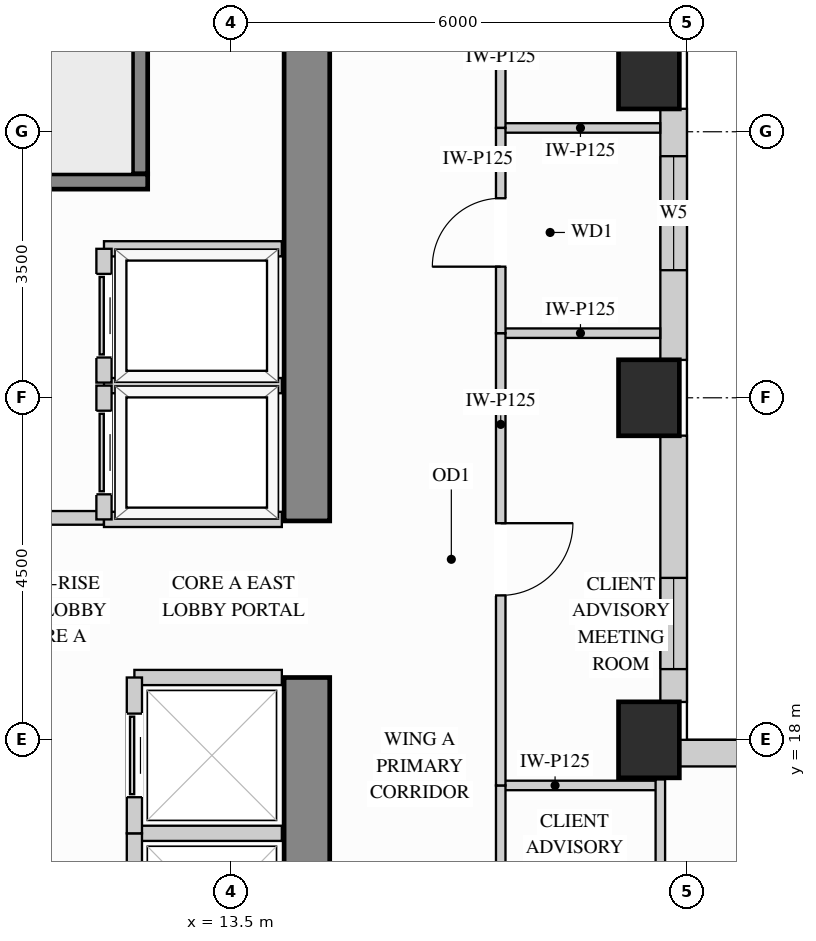
"""IFC4 building model, lengths in metres.
Left out: names, types, materials, properties, quantities, classifications, styles, units other than length and angle.
Written with IfcOpenShell. Run it as: python <this file> out.ifc"""

import sys

from ifc_helpers import new_model, si_unit, direction, frame, frame_2d, origin, origin_2d, place, context, subcontext, project, spatial, rectangle, extrude, source, transform, mapped, element, fill, save


model = new_model("IFC4")
c1 = context("Model", 3, precision=1e-05, world=origin(), true_north=direction((0.0, 1.0)))
c2 = subcontext(c1, "Body", "Model", "MODEL_VIEW")
j1 = project(units=[si_unit("LENGTHUNIT", "METRE"), si_unit("PLANEANGLEUNIT", "RADIAN")], contexts=[c1])
p1 = place(None, origin())
s1 = spatial("IfcSite", under=j1, at=p1, CompositionType="ELEMENT")
p2 = place(p1, origin())
s2 = spatial("IfcBuilding", under=s1, at=p2, CompositionType="ELEMENT")
p3 = place(p2, frame((0.0, 0.0, 164.7)))
s3 = spatial("IfcBuildingStorey", under=s2, at=p3, CompositionType="ELEMENT", Elevation=164.7)
m1 = source(origin(), c2, "Body", "SweptSolid", [
    extrude(rectangle(XDim=0.8, YDim=1.0, at=origin_2d()), origin(), (0.0, 0.0, 1.0), 3.4),
])
for number, where, z_axis, x_axis in (
    (1, (19.0, 18.0, 0.0), (0.0, 0.0, 1.0), (1.0, 0.0, 0.0)),
    (2, (19.0, 22.5, 0.0), (0.0, 0.0, 1.0), (1.0, 0.0, 0.0)),
    (3, (19.0, 26.8, 0.0), (0.0, 0.0, 1.0), (1.0, 0.0, 0.0)),
):
    element("IfcColumn", number, at=place(p3, frame(where, z_axis=z_axis, x_axis=x_axis)), inside=s3, PredefinedType="COLUMN", context=c2, shape_type="MappedRepresentation", body=[
        mapped(m1, transform((0.0, 0.0, 0.0), x_axis=(1.0, 0.0, 0.0), y_axis=(0.0, 1.0, 0.0), z_axis=(0.0, 0.0, 1.0))),
    ])
m2 = source(origin(), c2, "Body", "SweptSolid", [
    extrude(rectangle(XDim=10.02, YDim=0.6, at=frame_2d((5.01, 0.0))), origin(), (0.0, 0.0, 1.0), 3.4),
])
p4 = place(p3, frame((14.5, 8.8, 0.0), z_axis=(0.0, 0.0, 1.0), x_axis=(0.0, 1.0, 0.0)))
e4 = element("IfcWall", 4, at=p4, inside=s3, PredefinedType="SHEAR", context=c2, shape_type="MappedRepresentation", body=[
    mapped(m2, transform((0.0, 0.0, 0.0), x_axis=(1.0, 0.0, 0.0), y_axis=(0.0, 1.0, 0.0), z_axis=(0.0, 0.0, 1.0))),
])
m3 = source(origin(), c2, "Body", "SweptSolid", [
    extrude(rectangle(XDim=8.32, YDim=0.6, at=frame_2d((4.16, 0.0))), origin(), (0.0, 0.0, 1.0), 3.4),
])
p5 = place(p3, frame((14.5, 20.88, 0.0), z_axis=(0.0, 0.0, 1.0), x_axis=(0.0, 1.0, 0.0)))
e5 = element("IfcWall", 5, at=p5, inside=s3, PredefinedType="SHEAR", context=c2, shape_type="MappedRepresentation", body=[
    mapped(m3, transform((0.0, 0.0, 0.0), x_axis=(1.0, 0.0, 0.0), y_axis=(0.0, 1.0, 0.0), z_axis=(0.0, 0.0, 1.0))),
])
p6 = place(p3, frame((34.502, 17.825, 0.0), z_axis=(0.0, 0.0, 1.0), x_axis=(-1.0, 0.0, 0.0)))
e6 = element("IfcWall", 6, at=p6, inside=s3, PredefinedType="SOLIDWALL", context=c2, shape_type="SweptSolid", body=[
    extrude(rectangle(XDim=15.104, YDim=0.35, at=frame_2d((7.552, 0.0))), origin(), (0.0, 0.0, 1.0), 3.385),
])
p7 = place(p6, frame((4.131, 0.0, 0.78)))
e7 = element("IfcOpeningElement", 7, at=p7, cuts=e6, PredefinedType="OPENING", context=c2, shape_type="SweptSolid", body=[
    extrude(rectangle(XDim=1.5, YDim=2.0, at=frame_2d((0.75, 1.0))), frame((0.0, 0.185, 0.0), z_axis=(0.0, -1.0, 0.0), x_axis=(1.0, 0.0, 0.0)), (0.0, 0.0, 1.0), 0.37),
])
p8 = place(p6, frame((9.442, 0.0, 0.78)))
e8 = element("IfcOpeningElement", 8, at=p8, cuts=e6, PredefinedType="OPENING", context=c2, shape_type="SweptSolid", body=[
    extrude(rectangle(XDim=1.5, YDim=2.0, at=frame_2d((0.75, 1.0))), frame((0.0, 0.185, 0.0), z_axis=(0.0, -1.0, 0.0), x_axis=(1.0, 0.0, 0.0)), (0.0, 0.0, 1.0), 0.37),
])
p9 = place(p3, frame((19.325, 18.498, 0.0), z_axis=(0.0, 0.0, 1.0), x_axis=(0.0, 1.0, 0.0)))
e9 = element("IfcWall", 9, at=p9, inside=s3, PredefinedType="SOLIDWALL", context=c2, shape_type="SweptSolid", body=[
    extrude(rectangle(XDim=3.504, YDim=0.35, at=frame_2d((1.752, 0.0))), origin(), (0.0, 0.0, 1.0), 2.612),
])
p10 = place(p9, frame((0.433, 0.0, 0.78)))
e10 = element("IfcOpeningElement", 10, at=p10, cuts=e9, PredefinedType="OPENING", context=c2, shape_type="SweptSolid", body=[
    extrude(rectangle(XDim=1.2, YDim=1.652, at=frame_2d((0.6, 0.826))), frame((0.0, 0.185, 0.0), z_axis=(0.0, -1.0, 0.0), x_axis=(1.0, 0.0, 0.0)), (0.0, 0.0, 1.0), 0.37),
])
p11 = place(p3, frame((19.325, 22.998, 0.0), z_axis=(0.0, 0.0, 1.0), x_axis=(0.0, 1.0, 0.0)))
e11 = element("IfcWall", 11, at=p11, inside=s3, PredefinedType="SOLIDWALL", context=c2, shape_type="SweptSolid", body=[
    extrude(rectangle(XDim=3.304, YDim=0.35, at=frame_2d((1.652, 0.0))), origin(), (0.0, 0.0, 1.0), 2.612),
])
p12 = place(p11, frame((1.18, 0.0, 0.78)))
e12 = element("IfcOpeningElement", 12, at=p12, cuts=e11, PredefinedType="OPENING", context=c2, shape_type="SweptSolid", body=[
    extrude(rectangle(XDim=1.5, YDim=1.652, at=frame_2d((0.75, 0.826))), frame((0.0, 0.185, 0.0), z_axis=(0.0, -1.0, 0.0), x_axis=(1.0, 0.0, 0.0)), (0.0, 0.0, 1.0), 0.37),
])
p13 = place(p3, frame((7.15, 20.92, 0.0), z_axis=(0.0, 0.0, 1.0), x_axis=(1.0, 0.0, 0.0)))
e13 = element("IfcWall", 13, at=p13, inside=s3, PredefinedType="PARTITIONING", context=c2, shape_type="SweptSolid", body=[
    extrude(rectangle(XDim=4.68, YDim=0.18, at=frame_2d((2.34, 0.0))), origin(), (0.0, 0.0, 1.0), 3.385),
])
p14 = place(p13, frame((2.2, 0.0, 0.0)))
e14 = element("IfcOpeningElement", 14, at=p14, cuts=e13, PredefinedType="OPENING", context=c2, shape_type="SweptSolid", body=[
    extrude(rectangle(XDim=1.1, YDim=2.15, at=frame_2d((0.55, 1.075))), frame((0.0, 0.1, 0.0), z_axis=(0.0, -1.0, 0.0), x_axis=(1.0, 0.0, 0.0)), (0.0, 0.0, 1.0), 0.2),
])
m4 = source(origin(), c2, "Body", "SweptSolid", [
    extrude(rectangle(XDim=2.1, YDim=0.125, at=frame_2d((1.05, 0.0))), origin(), (0.0, 0.0, 1.0), 3.385),
])
p15 = place(p3, frame((17.05, 17.4, 0.0), z_axis=(0.0, 0.0, 1.0), x_axis=(1.0, 0.0, 0.0)))
e15 = element("IfcWall", 15, at=p15, inside=s3, PredefinedType="PARTITIONING", context=c2, shape_type="MappedRepresentation", body=[
    mapped(m4, transform((0.0, 0.0, 0.0), x_axis=(1.0, 0.0, 0.0), y_axis=(0.0, 1.0, 0.0), z_axis=(0.0, 0.0, 1.0))),
])
m5 = source(origin(), c2, "Body", "SweptSolid", [
    extrude(rectangle(XDim=2.098, YDim=0.125, at=frame_2d((1.049, 0.0))), origin(), (0.0, 0.0, 1.0), 3.385),
])
for number, where, z_axis, x_axis in (
    (16, (17.05, 23.35, 0.0), (0.0, 0.0, 1.0), (1.0, 0.0, 0.0)),
    (17, (17.05, 26.05, 0.0), (0.0, 0.0, 1.0), (1.0, 0.0, 0.0)),
):
    element("IfcWall", number, at=place(p3, frame(where, z_axis=z_axis, x_axis=x_axis)), inside=s3, PredefinedType="PARTITIONING", context=c2, shape_type="MappedRepresentation", body=[
        mapped(m5, transform((0.0, 0.0, 0.0), x_axis=(1.0, 0.0, 0.0), y_axis=(0.0, 1.0, 0.0), z_axis=(0.0, 0.0, 1.0))),
    ])
m6 = source(origin(), c2, "Body", "SweptSolid", [
    extrude(rectangle(XDim=3.46, YDim=0.125, at=frame_2d((1.73, 0.0))), origin(), (0.0, 0.0, 1.0), 2.773),
])
p16 = place(p3, frame((19.15, 14.02, 0.0), z_axis=(0.0, 0.0, 1.0), x_axis=(0.0, 1.0, 0.0)))
e18 = element("IfcWall", 18, at=p16, inside=s3, PredefinedType="PARTITIONING", context=c2, shape_type="MappedRepresentation", body=[
    mapped(m6, transform((0.0, 0.0, 0.0), x_axis=(1.0, 0.0, 0.0), y_axis=(0.0, 1.0, 0.0), z_axis=(0.0, 0.0, 1.0))),
])
p17 = place(p3, frame((17.05, 12.35, 0.0), z_axis=(0.0, 0.0, 1.0), x_axis=(0.0, 1.0, 0.0)))
e19 = element("IfcWall", 19, at=p17, inside=s3, PredefinedType="PARTITIONING", context=c2, shape_type="SweptSolid", body=[
    extrude(rectangle(XDim=5.05, YDim=0.125, at=frame_2d((2.525, 0.0))), origin(), (0.0, 0.0, 1.0), 3.385),
])
p18 = place(p17, frame((2.05, 0.0, 0.0)))
e20 = element("IfcOpeningElement", 20, at=p18, cuts=e19, PredefinedType="OPENING", context=c2, shape_type="SweptSolid", body=[
    extrude(rectangle(XDim=0.95, YDim=2.15, at=frame_2d((0.475, 1.075))), frame((0.0, 0.073, 0.0), z_axis=(0.0, -1.0, 0.0), x_axis=(1.0, 0.0, 0.0)), (0.0, 0.0, 1.0), 0.145),
])
p19 = place(p3, frame((17.05, 17.4, 0.0), z_axis=(0.0, 0.0, 1.0), x_axis=(0.0, 1.0, 0.0)))
e21 = element("IfcWall", 21, at=p19, inside=s3, PredefinedType="PARTITIONING", context=c2, shape_type="SweptSolid", body=[
    extrude(rectangle(XDim=5.95, YDim=0.125, at=frame_2d((2.975, 0.0))), origin(), (0.0, 0.0, 1.0), 3.385),
])
p20 = place(p19, frame((2.5, 0.0, 0.0)))
e22 = element("IfcOpeningElement", 22, at=p20, cuts=e21, PredefinedType="OPENING", context=c2, shape_type="SweptSolid", body=[
    extrude(rectangle(XDim=0.95, YDim=2.15, at=frame_2d((0.475, 1.075))), frame((0.0, 0.073, 0.0), z_axis=(0.0, -1.0, 0.0), x_axis=(1.0, 0.0, 0.0)), (0.0, 0.0, 1.0), 0.145),
])
p21 = place(p3, frame((17.05, 26.05, 0.0), z_axis=(0.0, 0.0, 1.0), x_axis=(0.0, 1.0, 0.0)))
e23 = element("IfcWall", 23, at=p21, inside=s3, PredefinedType="PARTITIONING", context=c2, shape_type="SweptSolid", body=[
    extrude(rectangle(XDim=6.1, YDim=0.125, at=frame_2d((3.05, 0.0))), origin(), (0.0, 0.0, 1.0), 3.385),
])
p22 = place(p21, frame((2.575, 0.0, 0.0)))
e24 = element("IfcOpeningElement", 24, at=p22, cuts=e23, PredefinedType="OPENING", context=c2, shape_type="SweptSolid", body=[
    extrude(rectangle(XDim=0.95, YDim=2.15, at=frame_2d((0.475, 1.075))), frame((0.0, 0.073, 0.0), z_axis=(0.0, -1.0, 0.0), x_axis=(1.0, 0.0, 0.0)), (0.0, 0.0, 1.0), 0.145),
])
p23 = place(p3, frame((17.05, 23.35, 0.0), z_axis=(0.0, 0.0, 1.0), x_axis=(0.0, 1.0, 0.0)))
e25 = element("IfcWall", 25, at=p23, inside=s3, PredefinedType="PARTITIONING", context=c2, shape_type="SweptSolid", body=[
    extrude(rectangle(XDim=2.7, YDim=0.125, at=frame_2d((1.35, 0.0))), origin(), (0.0, 0.0, 1.0), 3.385),
])
p24 = place(p23, frame((0.875, 0.0, 0.0)))
e26 = element("IfcOpeningElement", 26, at=p24, cuts=e25, PredefinedType="OPENING", context=c2, shape_type="SweptSolid", body=[
    extrude(rectangle(XDim=0.9, YDim=2.15, at=frame_2d((0.45, 1.075))), frame((0.0, 0.073, 0.0), z_axis=(0.0, -1.0, 0.0), x_axis=(1.0, 0.0, 0.0)), (0.0, 0.0, 1.0), 0.145),
])
m7 = source(origin(), c2, "Body", "SweptSolid", [
    extrude(rectangle(XDim=2.34, YDim=0.2, at=frame_2d((1.17, 0.0))), origin(), (0.0, 0.0, 1.0), 3.385),
])
for number, where, z_axis, x_axis in (
    (27, (11.83, 22.66, 0.0), (0.0, 0.0, 1.0), (1.0, 0.0, 0.0)),
    (28, (11.83, 20.9, 0.0), (0.0, 0.0, 1.0), (1.0, 0.0, 0.0)),
):
    element("IfcWall", number, at=place(p3, frame(where, z_axis=z_axis, x_axis=x_axis)), inside=s3, PredefinedType="PARTITIONING", context=c2, shape_type="MappedRepresentation", body=[
        mapped(m7, transform((0.0, 0.0, 0.0), x_axis=(1.0, 0.0, 0.0), y_axis=(0.0, 1.0, 0.0), z_axis=(0.0, 0.0, 1.0))),
    ])
p25 = place(p3, frame((11.83, 20.9, 0.0), z_axis=(0.0, 0.0, 1.0), x_axis=(0.0, 1.0, 0.0)))
e29 = element("IfcWall", 29, at=p25, inside=s3, PredefinedType="PARTITIONING", context=c2, shape_type="SweptSolid", body=[
    extrude(rectangle(XDim=1.76, YDim=0.2, at=frame_2d((0.88, 0.0))), origin(), (0.0, 0.0, 1.0), 3.385),
])
p26 = place(p25, frame((0.33, 0.0, 0.0)))
e30 = element("IfcOpeningElement", 30, at=p26, cuts=e29, PredefinedType="OPENING", context=c2, shape_type="SweptSolid", body=[
    extrude(rectangle(XDim=1.1, YDim=2.2, at=frame_2d((0.55, 1.1))), frame((0.0, 0.11, 0.0), z_axis=(0.0, -1.0, 0.0), x_axis=(1.0, 0.0, 0.0)), (0.0, 0.0, 1.0), 0.22),
])
p27 = place(p3, frame((11.83, 24.46, 0.0), z_axis=(0.0, 0.0, 1.0), x_axis=(1.0, 0.0, 0.0)))
e31 = element("IfcWall", 31, at=p27, inside=s3, PredefinedType="PARTITIONING", context=c2, shape_type="MappedRepresentation", body=[
    mapped(m7, transform((0.0, 0.0, 0.0), x_axis=(1.0, 0.0, 0.0), y_axis=(0.0, 1.0, 0.0), z_axis=(0.0, 0.0, 1.0))),
])
p28 = place(p3, frame((11.83, 22.7, 0.0), z_axis=(0.0, 0.0, 1.0), x_axis=(0.0, 1.0, 0.0)))
e32 = element("IfcWall", 32, at=p28, inside=s3, PredefinedType="PARTITIONING", context=c2, shape_type="SweptSolid", body=[
    extrude(rectangle(XDim=1.76, YDim=0.2, at=frame_2d((0.88, 0.0))), origin(), (0.0, 0.0, 1.0), 3.385),
])
p29 = place(p28, frame((0.33, 0.0, 0.0)))
e33 = element("IfcOpeningElement", 33, at=p29, cuts=e32, PredefinedType="OPENING", context=c2, shape_type="SweptSolid", body=[
    extrude(rectangle(XDim=1.1, YDim=2.2, at=frame_2d((0.55, 1.1))), frame((0.0, 0.11, 0.0), z_axis=(0.0, -1.0, 0.0), x_axis=(1.0, 0.0, 0.0)), (0.0, 0.0, 1.0), 0.22),
])
m8 = source(origin(), c2, "Body", "SweptSolid", [
    extrude(rectangle(XDim=1.94, YDim=0.2, at=frame_2d((0.97, 0.0))), origin(), (0.0, 0.0, 1.0), 3.385),
])
p30 = place(p3, frame((12.23, 16.77, 0.0), z_axis=(0.0, 0.0, 1.0), x_axis=(1.0, 0.0, 0.0)))
e34 = element("IfcWall", 34, at=p30, inside=s3, PredefinedType="PARTITIONING", context=c2, shape_type="MappedRepresentation", body=[
    mapped(m8, transform((0.0, 0.0, 0.0), x_axis=(1.0, 0.0, 0.0), y_axis=(0.0, 1.0, 0.0), z_axis=(0.0, 0.0, 1.0))),
])
p31 = place(p3, frame((12.23, 14.7, 0.0), z_axis=(0.0, 0.0, 1.0), x_axis=(0.0, 1.0, 0.0)))
e35 = element("IfcWall", 35, at=p31, inside=s3, PredefinedType="PARTITIONING", context=c2, shape_type="SweptSolid", body=[
    extrude(rectangle(XDim=2.07, YDim=0.2, at=frame_2d((1.035, 0.0))), origin(), (0.0, 0.0, 1.0), 3.385),
])
p32 = place(p31, frame((0.485, 0.0, 0.0)))
e36 = element("IfcOpeningElement", 36, at=p32, cuts=e35, PredefinedType="OPENING", context=c2, shape_type="SweptSolid", body=[
    extrude(rectangle(XDim=1.1, YDim=2.2, at=frame_2d((0.55, 1.1))), frame((0.0, 0.11, 0.0), z_axis=(0.0, -1.0, 0.0), x_axis=(1.0, 0.0, 0.0)), (0.0, 0.0, 1.0), 0.22),
])
p33 = place(p3, frame((12.23, 18.82, 0.0), z_axis=(0.0, 0.0, 1.0), x_axis=(1.0, 0.0, 0.0)))
e37 = element("IfcWall", 37, at=p33, inside=s3, PredefinedType="PARTITIONING", context=c2, shape_type="MappedRepresentation", body=[
    mapped(m8, transform((0.0, 0.0, 0.0), x_axis=(1.0, 0.0, 0.0), y_axis=(0.0, 1.0, 0.0), z_axis=(0.0, 0.0, 1.0))),
])
p34 = place(p3, frame((12.23, 16.77, 0.0), z_axis=(0.0, 0.0, 1.0), x_axis=(0.0, 1.0, 0.0)))
e38 = element("IfcWall", 38, at=p34, inside=s3, PredefinedType="PARTITIONING", context=c2, shape_type="SweptSolid", body=[
    extrude(rectangle(XDim=2.05, YDim=0.2, at=frame_2d((1.025, 0.0))), origin(), (0.0, 0.0, 1.0), 3.385),
])
p35 = place(p34, frame((0.475, 0.0, 0.0)))
e39 = element("IfcOpeningElement", 39, at=p35, cuts=e38, PredefinedType="OPENING", context=c2, shape_type="SweptSolid", body=[
    extrude(rectangle(XDim=1.1, YDim=2.2, at=frame_2d((0.55, 1.1))), frame((0.0, 0.11, 0.0), z_axis=(0.0, -1.0, 0.0), x_axis=(1.0, 0.0, 0.0)), (0.0, 0.0, 1.0), 0.22),
])
m9 = source(origin(), c2, "Body", "SweptSolid", [
    extrude(rectangle(XDim=3.753, YDim=0.2, at=frame_2d((1.876, 0.0))), origin(), (0.0, 0.0, 1.0), 3.4),
])
p36 = place(p3, frame((12.305, 25.445, 0.0), z_axis=(0.0, 0.0, 1.0), x_axis=(0.0, 1.0, 0.0)))
e40 = element("IfcWall", 40, at=p36, inside=s3, PredefinedType="SHEAR", context=c2, shape_type="MappedRepresentation", body=[
    mapped(m9, transform((0.0, 0.0, 0.0), x_axis=(1.0, 0.0, 0.0), y_axis=(0.0, 1.0, 0.0), z_axis=(0.0, 0.0, 1.0))),
])
p37 = place(p3, frame((4.802, 25.345, 0.0), z_axis=(0.0, 0.0, 1.0), x_axis=(1.0, 0.0, 0.0)))
e41 = element("IfcWall", 41, at=p37, inside=s3, PredefinedType="SHEAR", context=c2, shape_type="SweptSolid", body=[
    extrude(rectangle(XDim=7.603, YDim=0.2, at=frame_2d((3.802, 0.0))), origin(), (0.0, 0.0, 1.0), 3.4),
])
p38 = place(p37, frame((0.4, 0.0, 0.0)))
e42 = element("IfcOpeningElement", 42, at=p38, cuts=e41, PredefinedType="OPENING", context=c2, shape_type="SweptSolid", body=[
    extrude(rectangle(XDim=1.1, YDim=2.15, at=frame_2d((0.55, 1.075))), frame((0.0, 0.11, 0.0), z_axis=(0.0, -1.0, 0.0), x_axis=(1.0, 0.0, 0.0)), (0.0, 0.0, 1.0), 0.22),
])
m10 = source(origin(), c2, "Body", "SweptSolid", [
    extrude(rectangle(XDim=1.1, YDim=2.2, at=frame_2d((0.55, 1.1))), frame((0.0, 0.025, 0.0), z_axis=(0.0, -1.0, 0.0), x_axis=(1.0, 0.0, 0.0)), (0.0, 0.0, 1.0), 0.05),
])
p39 = place(p26, origin())
e43 = element("IfcDoor", 43, at=p39, inside=s3, OperationType="SLIDING_TO_LEFT", PredefinedType="DOOR", context=c2, shape_type="MappedRepresentation", body=[
    mapped(m10, transform((0.0, 0.0, 0.0), x_axis=(1.0, 0.0, 0.0), y_axis=(0.0, 1.0, 0.0), z_axis=(0.0, 0.0, 1.0))),
])
fill(e30, e43)
p40 = place(p29, origin())
e44 = element("IfcDoor", 44, at=p40, inside=s3, OperationType="SLIDING_TO_LEFT", PredefinedType="DOOR", context=c2, shape_type="MappedRepresentation", body=[
    mapped(m10, transform((0.0, 0.0, 0.0), x_axis=(1.0, 0.0, 0.0), y_axis=(0.0, 1.0, 0.0), z_axis=(0.0, 0.0, 1.0))),
])
fill(e33, e44)
p41 = place(p35, origin())
e45 = element("IfcDoor", 45, at=p41, inside=s3, OperationType="SLIDING_TO_LEFT", PredefinedType="DOOR", context=c2, shape_type="MappedRepresentation", body=[
    mapped(m10, transform((0.0, 0.0, 0.0), x_axis=(1.0, 0.0, 0.0), y_axis=(0.0, 1.0, 0.0), z_axis=(0.0, 0.0, 1.0))),
])
fill(e39, e45)
m11 = source(origin(), c2, "Body", "SweptSolid", [
    extrude(rectangle(XDim=0.95, YDim=2.15, at=frame_2d((0.475, 1.075))), frame((0.0, 0.025, 0.0), z_axis=(0.0, -1.0, 0.0), x_axis=(1.0, 0.0, 0.0)), (0.0, 0.0, 1.0), 0.05),
])
p42 = place(p20, origin())
e46 = element("IfcDoor", 46, at=p42, inside=s3, OperationType="SINGLE_SWING_RIGHT", PredefinedType="DOOR", context=c2, shape_type="MappedRepresentation", body=[
    mapped(m11, transform((0.0, 0.0, 0.0), x_axis=(1.0, 0.0, 0.0), y_axis=(0.0, 1.0, 0.0), z_axis=(0.0, 0.0, 1.0))),
])
fill(e22, e46)
m12 = source(origin(), c2, "Body", "SweptSolid", [
    extrude(rectangle(XDim=0.9, YDim=2.15, at=frame_2d((0.45, 1.075))), frame((0.0, 0.025, 0.0), z_axis=(0.0, -1.0, 0.0), x_axis=(1.0, 0.0, 0.0)), (0.0, 0.0, 1.0), 0.05),
])
p43 = place(p24, origin())
e47 = element("IfcDoor", 47, at=p43, inside=s3, OperationType="SINGLE_SWING_LEFT", PredefinedType="DOOR", context=c2, shape_type="MappedRepresentation", body=[
    mapped(m12, transform((0.0, 0.0, 0.0), x_axis=(1.0, 0.0, 0.0), y_axis=(0.0, 1.0, 0.0), z_axis=(0.0, 0.0, 1.0))),
])
fill(e26, e47)
m13 = source(origin(), c2, "Body", "SweptSolid", [
    extrude(rectangle(XDim=1.2, YDim=1.652, at=frame_2d((0.6, 0.826))), frame((0.0, 0.03, 0.0), z_axis=(0.0, -1.0, 0.0), x_axis=(1.0, 0.0, 0.0)), (0.0, 0.0, 1.0), 0.06),
])
p44 = place(p10, origin())
e48 = element("IfcWindow", 48, at=p44, inside=s3, PartitioningType="SINGLE_PANEL", PredefinedType="WINDOW", context=c2, shape_type="MappedRepresentation", body=[
    mapped(m13, transform((0.0, 0.0, 0.0), x_axis=(1.0, 0.0, 0.0), y_axis=(0.0, 1.0, 0.0), z_axis=(0.0, 0.0, 1.0))),
])
fill(e10, e48)
m14 = source(origin(), c2, "Body", "SweptSolid", [
    extrude(rectangle(XDim=1.5, YDim=1.652, at=frame_2d((0.75, 0.826))), frame((0.0, 0.03, 0.0), z_axis=(0.0, -1.0, 0.0), x_axis=(1.0, 0.0, 0.0)), (0.0, 0.0, 1.0), 0.06),
])
p45 = place(p12, origin())
e49 = element("IfcWindow", 49, at=p45, inside=s3, PartitioningType="SINGLE_PANEL", PredefinedType="WINDOW", context=c2, shape_type="MappedRepresentation", body=[
    mapped(m14, transform((0.0, 0.0, 0.0), x_axis=(1.0, 0.0, 0.0), y_axis=(0.0, 1.0, 0.0), z_axis=(0.0, 0.0, 1.0))),
])
fill(e12, e49)
save(model, sys.argv[1])
